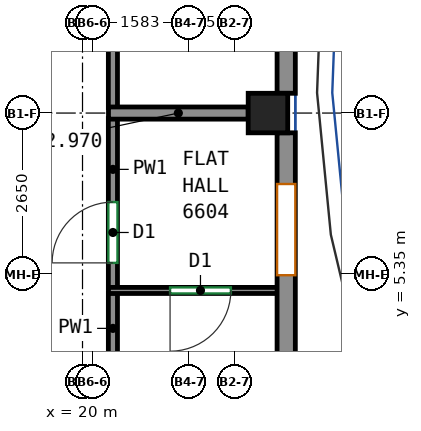
"""IFC4 building model, lengths in metres.
Left out: names, types, materials, properties, quantities, classifications, styles, units other than length and angle.
Written with IfcOpenShell. Run it as: python <this file> out.ifc"""

import sys

from ifc_helpers import new_model, si_unit, direction, frame, frame_2d, origin, origin_2d, place, context, subcontext, project, spatial, rectangle, extrude, source, transform, mapped, element, fill, save


model = new_model("IFC4")
c1 = context("Model", 3, precision=1e-05, world=origin(), true_north=direction((0.0, 1.0)))
c2 = subcontext(c1, "Body", "Model", "MODEL_VIEW")
j1 = project(units=[si_unit("LENGTHUNIT", "METRE"), si_unit("PLANEANGLEUNIT", "RADIAN")], contexts=[c1])
p1 = place(None, origin())
s1 = spatial("IfcSite", under=j1, at=p1, CompositionType="ELEMENT")
p2 = place(p1, origin())
s2 = spatial("IfcBuilding", under=s1, at=p2, CompositionType="ELEMENT")
p3 = place(p2, frame((0.0, 0.0, 270.4)))
s3 = spatial("IfcBuildingStorey", under=s2, at=p3, CompositionType="ELEMENT", Elevation=270.4)
m1 = source(origin(), c2, "Body", "SweptSolid", [
    extrude(rectangle(XDim=0.65, YDim=0.65, at=origin_2d()), origin(), (0.0, 0.0, 1.0), 3.12),
])
p4 = place(p3, frame((23.05, 8.0, 0.0), z_axis=(0.0, 0.0, 1.0), x_axis=(1.0, 0.0, 0.0)))
e1 = element("IfcColumn", 1, at=p4, inside=s3, PredefinedType="COLUMN", context=c2, shape_type="MappedRepresentation", body=[
    mapped(m1, transform((0.0, 0.0, 0.0))),
])
m2 = source(origin(), c2, "Body", "SweptSolid", [
    extrude(rectangle(XDim=8.183, YDim=0.3, at=frame_2d((4.092, 0.0))), origin(), (0.0, 0.0, 1.0), 3.12),
])
p5 = place(p3, frame((23.35, -0.508, 0.0), z_axis=(0.0, 0.0, 1.0), x_axis=(0.0, 1.0, 0.0)))
e2 = element("IfcWall", 2, at=p5, inside=s3, PredefinedType="SOLIDWALL", context=c2, shape_type="MappedRepresentation", body=[
    mapped(m2, transform((0.0, 0.0, 0.0))),
])
p6 = place(p5, frame((1.75, 0.0, 0.8)))
e3 = element("IfcOpeningElement", 3, at=p6, cuts=e2, PredefinedType="OPENING", context=c2, shape_type="SweptSolid", body=[
    extrude(rectangle(XDim=1.5, YDim=2.05, at=frame_2d((0.75, 1.025))), frame((0.0, 0.16, 0.0), z_axis=(0.0, -1.0, 0.0), x_axis=(1.0, 0.0, 0.0)), (0.0, 0.0, 1.0), 0.32),
])
p7 = place(p5, frame((0.45, 0.0, 0.0)))
e4 = element("IfcOpeningElement", 4, at=p7, cuts=e2, PredefinedType="OPENING", context=c2, shape_type="SweptSolid", body=[
    extrude(rectangle(XDim=1.0, YDim=2.1, at=frame_2d((0.5, 1.05))), frame((0.0, 0.16, 0.0), z_axis=(0.0, -1.0, 0.0), x_axis=(1.0, 0.0, 0.0)), (0.0, 0.0, 1.0), 0.32),
])
p8 = place(p5, frame((5.842, 0.0, 0.8)))
e5 = element("IfcOpeningElement", 5, at=p8, cuts=e2, PredefinedType="OPENING", context=c2, shape_type="SweptSolid", body=[
    extrude(rectangle(XDim=1.5, YDim=2.05, at=frame_2d((0.75, 1.025))), frame((0.0, 0.16, 0.0), z_axis=(0.0, -1.0, 0.0), x_axis=(1.0, 0.0, 0.0)), (0.0, 0.0, 1.0), 0.32),
])
m3 = source(origin(), c2, "Body", "SweptSolid", [
    extrude(rectangle(XDim=13.35, YDim=0.3, at=frame_2d((6.675, 0.0))), origin(), (0.0, 0.0, 1.0), 3.12),
])
p9 = place(p3, frame((23.35, 8.325, 0.0), z_axis=(0.0, 0.0, 1.0), x_axis=(0.0, 1.0, 0.0)))
e6 = element("IfcWall", 6, at=p9, inside=s3, PredefinedType="SOLIDWALL", context=c2, shape_type="MappedRepresentation", body=[
    mapped(m3, transform((0.0, 0.0, 0.0))),
])
p10 = place(p9, frame((0.919, 0.0, 0.8)))
e7 = element("IfcOpeningElement", 7, at=p10, cuts=e6, PredefinedType="OPENING", context=c2, shape_type="SweptSolid", body=[
    extrude(rectangle(XDim=1.5, YDim=2.05, at=frame_2d((0.75, 1.025))), frame((0.0, 0.16, 0.0), z_axis=(0.0, -1.0, 0.0), x_axis=(1.0, 0.0, 0.0)), (0.0, 0.0, 1.0), 0.32),
])
p11 = place(p9, frame((4.256, 0.0, 0.8)))
e8 = element("IfcOpeningElement", 8, at=p11, cuts=e6, PredefinedType="OPENING", context=c2, shape_type="SweptSolid", body=[
    extrude(rectangle(XDim=1.5, YDim=2.05, at=frame_2d((0.75, 1.025))), frame((0.0, 0.16, 0.0), z_axis=(0.0, -1.0, 0.0), x_axis=(1.0, 0.0, 0.0)), (0.0, 0.0, 1.0), 0.32),
])
p12 = place(p9, frame((7.594, 0.0, 0.8)))
e9 = element("IfcOpeningElement", 9, at=p12, cuts=e6, PredefinedType="OPENING", context=c2, shape_type="SweptSolid", body=[
    extrude(rectangle(XDim=1.5, YDim=2.05, at=frame_2d((0.75, 1.025))), frame((0.0, 0.16, 0.0), z_axis=(0.0, -1.0, 0.0), x_axis=(1.0, 0.0, 0.0)), (0.0, 0.0, 1.0), 0.32),
])
p13 = place(p9, frame((10.931, 0.0, 0.8)))
e10 = element("IfcOpeningElement", 10, at=p13, cuts=e6, PredefinedType="OPENING", context=c2, shape_type="SweptSolid", body=[
    extrude(rectangle(XDim=1.5, YDim=2.05, at=frame_2d((0.75, 1.025))), frame((0.0, 0.16, 0.0), z_axis=(0.0, -1.0, 0.0), x_axis=(1.0, 0.0, 0.0)), (0.0, 0.0, 1.0), 0.32),
])
p14 = place(p3, frame((20.5, 3.875, 0.0), z_axis=(0.0, 0.0, 1.0), x_axis=(0.0, 1.0, 0.0)))
e11 = element("IfcWall", 11, at=p14, inside=s3, PredefinedType="PARTITIONING", context=c2, shape_type="SweptSolid", body=[
    extrude(rectangle(XDim=1.168, YDim=0.15, at=frame_2d((0.584, 0.0))), origin(), (0.0, 0.0, 1.0), 3.12),
])
p15 = place(p3, frame((20.5, 5.123, 0.0), z_axis=(0.0, 0.0, 1.0), x_axis=(0.0, 1.0, 0.0)))
e12 = element("IfcWall", 12, at=p15, inside=s3, PredefinedType="PARTITIONING", context=c2, shape_type="SweptSolid", body=[
    extrude(rectangle(XDim=2.787, YDim=0.15, at=frame_2d((1.394, 0.0))), origin(), (0.0, 0.0, 1.0), 3.12),
])
p16 = place(p15, frame((0.413, 0.0, 0.0)))
e13 = element("IfcOpeningElement", 13, at=p16, cuts=e12, PredefinedType="OPENING", context=c2, shape_type="SweptSolid", body=[
    extrude(rectangle(XDim=1.0, YDim=2.1, at=frame_2d((0.5, 1.05))), frame((0.0, 0.085, 0.0), z_axis=(0.0, -1.0, 0.0), x_axis=(1.0, 0.0, 0.0)), (0.0, 0.0, 1.0), 0.17),
])
p17 = place(p3, frame((20.5, 8.09, 0.0), z_axis=(0.0, 0.0, 1.0), x_axis=(0.0, 1.0, 0.0)))
e14 = element("IfcWall", 14, at=p17, inside=s3, PredefinedType="PARTITIONING", context=c2, shape_type="SweptSolid", body=[
    extrude(rectangle(XDim=15.01, YDim=0.15, at=frame_2d((7.505, 0.0))), origin(), (0.0, 0.0, 1.0), 3.12),
])
p18 = place(p17, frame((7.505, 0.0, 0.0)))
e15 = element("IfcOpeningElement", 15, at=p18, cuts=e14, PredefinedType="OPENING", context=c2, shape_type="SweptSolid", body=[
    extrude(rectangle(XDim=0.9, YDim=2.1, at=frame_2d((0.45, 1.05))), frame((0.0, 0.085, 0.0), z_axis=(0.0, -1.0, 0.0), x_axis=(1.0, 0.0, 0.0)), (0.0, 0.0, 1.0), 0.17),
])
p19 = place(p3, frame((23.25, 5.083, 0.0), z_axis=(0.0, 0.0, 1.0), x_axis=(-1.0, 0.0, 0.0)))
e16 = element("IfcWall", 16, at=p19, inside=s3, PredefinedType="PARTITIONING", context=c2, shape_type="SweptSolid", body=[
    extrude(rectangle(XDim=2.823, YDim=0.1, at=frame_2d((1.412, 0.0))), origin(), (0.0, 0.0, 1.0), 3.12),
])
p20 = place(p19, frame((0.81, 0.0, 0.0)))
e17 = element("IfcOpeningElement", 17, at=p20, cuts=e16, PredefinedType="OPENING", context=c2, shape_type="SweptSolid", body=[
    extrude(rectangle(XDim=1.0, YDim=2.1, at=frame_2d((0.5, 1.05))), frame((0.0, 0.06, 0.0), z_axis=(0.0, -1.0, 0.0), x_axis=(1.0, 0.0, 0.0)), (0.0, 0.0, 1.0), 0.12),
])
p21 = place(p3, frame((20.427, 8.0, 0.0), z_axis=(0.0, 0.0, 1.0), x_axis=(1.0, 0.0, 0.0)))
e18 = element("IfcWall", 18, at=p21, inside=s3, PredefinedType="PARTITIONING", context=c2, shape_type="SweptSolid", body=[
    extrude(rectangle(XDim=2.298, YDim=0.2, at=frame_2d((1.149, 0.0))), origin(), (0.0, 0.0, 1.0), 2.57),
])
p22 = place(p8, origin())
e19 = element("IfcWindow", 19, at=p22, inside=s3, PartitioningType="SINGLE_PANEL", PredefinedType="WINDOW", context=c2, shape_type="SweptSolid", body=[
    extrude(rectangle(XDim=1.5, YDim=2.05, at=frame_2d((0.75, 1.025))), frame((0.0, 0.03, 0.0), z_axis=(0.0, -1.0, 0.0), x_axis=(1.0, 0.0, 0.0)), (0.0, 0.0, 1.0), 0.06),
])
fill(e5, e19)
p23 = place(p20, origin())
e20 = element("IfcDoor", 20, at=p23, inside=s3, OperationType="SINGLE_SWING_RIGHT", PredefinedType="DOOR", context=c2, shape_type="SweptSolid", body=[
    extrude(rectangle(XDim=1.0, YDim=2.1, at=frame_2d((0.5, 1.05))), frame((0.0, 0.025, 0.0), z_axis=(0.0, -1.0, 0.0), x_axis=(1.0, 0.0, 0.0)), (0.0, 0.0, 1.0), 0.05),
])
fill(e17, e20)
p24 = place(p16, origin())
e21 = element("IfcDoor", 21, at=p24, inside=s3, OperationType="SINGLE_SWING_LEFT", PredefinedType="DOOR", context=c2, shape_type="SweptSolid", body=[
    extrude(rectangle(XDim=1.0, YDim=2.1, at=frame_2d((0.5, 1.05))), frame((0.0, 0.025, 0.0), z_axis=(0.0, -1.0, 0.0), x_axis=(1.0, 0.0, 0.0)), (0.0, 0.0, 1.0), 0.05),
])
fill(e13, e21)
save(model, sys.argv[1])
